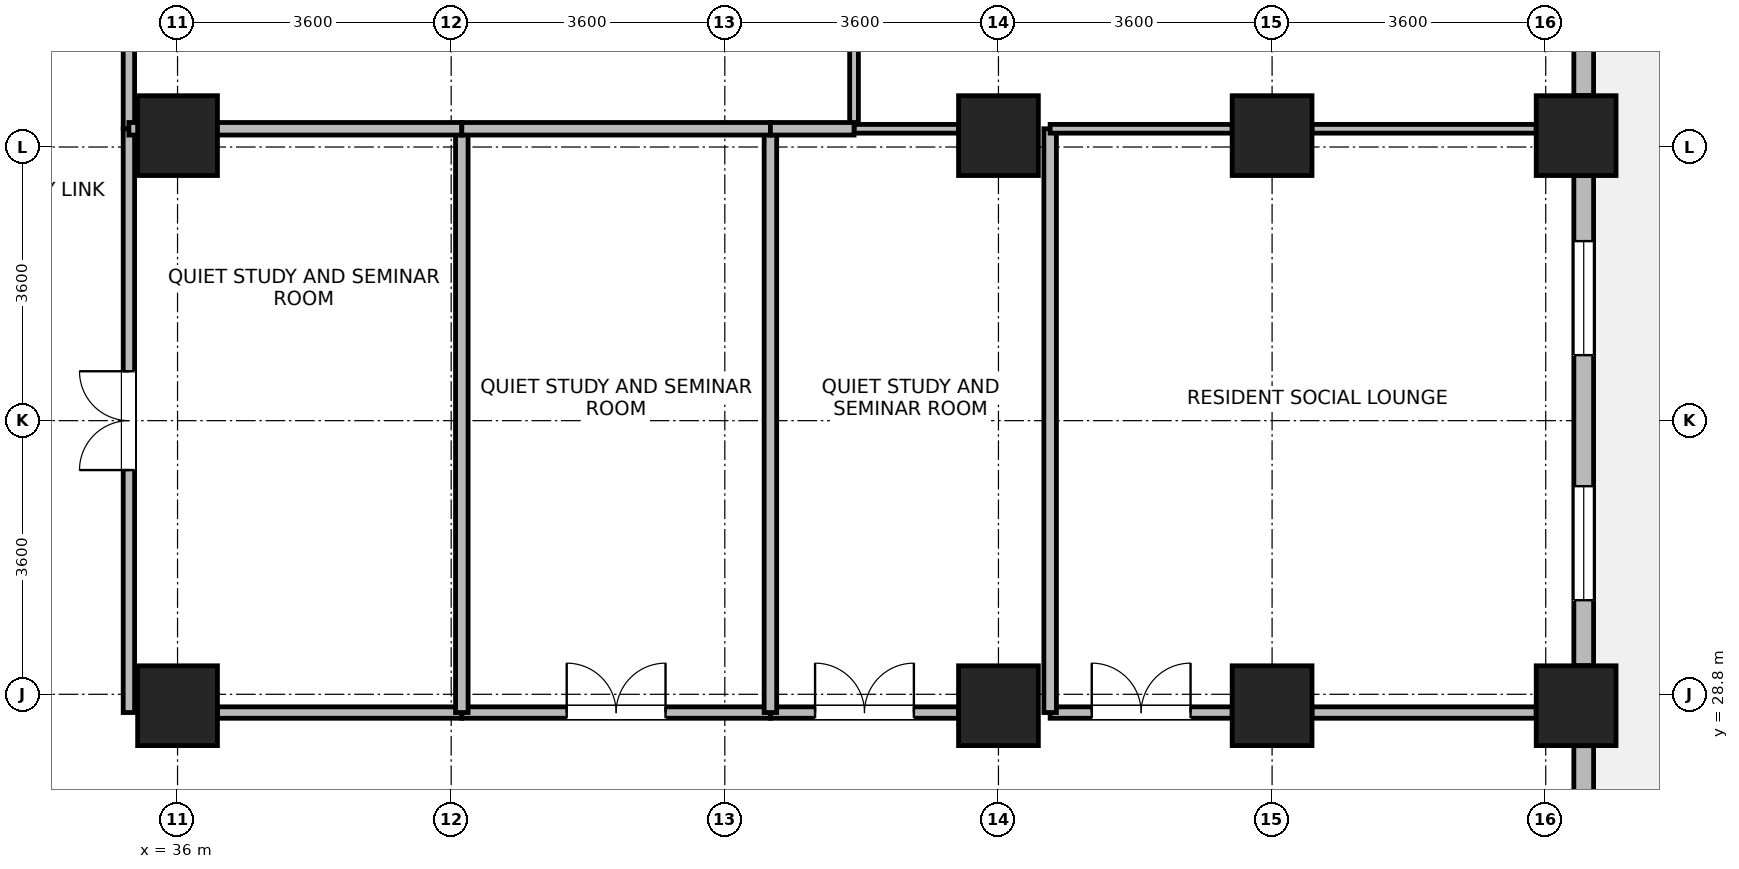
"""IFC4 building model, lengths in metres.
Left out: names, types, materials, properties, quantities, classifications, styles, units other than length and angle.
Written with IfcOpenShell. Run it as: python <this file> out.ifc"""

import sys

from ifc_helpers import new_model, si_unit, direction, frame, frame_2d, origin, origin_2d, place, context, subcontext, project, spatial, rectangle, extrude, source, transform, mapped, element, fill, save


model = new_model("IFC4")
c1 = context("Model", 3, precision=1e-05, world=origin(), true_north=direction((0.0, 1.0)))
c2 = subcontext(c1, "Body", "Model", "MODEL_VIEW")
j1 = project(units=[si_unit("LENGTHUNIT", "METRE"), si_unit("PLANEANGLEUNIT", "RADIAN")], contexts=[c1])
p1 = place(None, origin())
s1 = spatial("IfcSite", under=j1, at=p1, CompositionType="ELEMENT")
p2 = place(p1, origin())
s2 = spatial("IfcBuilding", under=s1, at=p2, CompositionType="ELEMENT")
p3 = place(p2, frame((0.0, 0.0, 173.5)))
s3 = spatial("IfcBuildingStorey", under=s2, at=p3, CompositionType="ELEMENT", Elevation=173.5)
m1 = source(origin(), c2, "Body", "SweptSolid", [
    extrude(rectangle(XDim=1.05, YDim=1.05, at=origin_2d()), origin(), (0.0, 0.0, 1.0), 3.7),
])
for number, where, z_axis, x_axis in (
    (1, (36.0, 28.65, 0.0), (0.0, 0.0, 1.0), (1.0, 0.0, 0.0)),
    (2, (36.0, 36.15, 0.0), (0.0, 0.0, 1.0), (1.0, 0.0, 0.0)),
    (3, (46.8, 28.65, 0.0), (0.0, 0.0, 1.0), (1.0, 0.0, 0.0)),
    (4, (46.8, 36.15, 0.0), (0.0, 0.0, 1.0), (1.0, 0.0, 0.0)),
    (5, (50.4, 28.65, 0.0), (0.0, 0.0, 1.0), (1.0, 0.0, 0.0)),
    (6, (50.4, 36.15, 0.0), (0.0, 0.0, 1.0), (1.0, 0.0, 0.0)),
    (7, (54.4, 28.65, 0.0), (0.0, 0.0, 1.0), (1.0, 0.0, 0.0)),
    (8, (54.4, 36.15, 0.0), (0.0, 0.0, 1.0), (1.0, 0.0, 0.0)),
):
    element("IfcColumn", number, at=place(p3, frame(where, z_axis=z_axis, x_axis=x_axis)), inside=s3, PredefinedType="COLUMN", context=c2, shape_type="MappedRepresentation", body=[
        mapped(m1, transform((0.0, 0.0, 0.0), x_axis=(1.0, 0.0, 0.0), y_axis=(0.0, 1.0, 0.0), z_axis=(0.0, 0.0, 1.0), scale=1.0)),
    ])
p4 = place(p3, frame((54.5, 28.124, 0.0), z_axis=(0.0, 0.0, 1.0), x_axis=(0.0, -1.0, 0.0)))
e9 = element("IfcWall", 9, at=p4, inside=s3, PredefinedType="STANDARD", context=c2, shape_type="SweptSolid", body=[
    extrude(rectangle(XDim=5.998, YDim=0.26, at=frame_2d((2.999, 0.0))), origin(), (0.0, 0.0, 1.0), 2.99),
])
p5 = place(p4, frame((3.749, 0.0, 0.85)))
e10 = element("IfcOpeningElement", 10, at=p5, cuts=e9, PredefinedType="OPENING", context=c2, shape_type="SweptSolid", body=[
    extrude(rectangle(XDim=1.5, YDim=1.85, at=frame_2d((0.75, 0.925))), frame((0.0, 0.14, 0.0), z_axis=(0.0, -1.0, 0.0), x_axis=(1.0, 0.0, 0.0)), (0.0, 0.0, 1.0), 0.28),
])
p6 = place(p4, frame((2.044, 0.0, 0.85)))
e11 = element("IfcOpeningElement", 11, at=p6, cuts=e9, PredefinedType="OPENING", context=c2, shape_type="SweptSolid", body=[
    extrude(rectangle(XDim=0.95, YDim=1.75, at=frame_2d((0.475, 0.875))), frame((0.0, 0.14, 0.0), z_axis=(0.0, -1.0, 0.0), x_axis=(1.0, 0.0, 0.0)), (0.0, 0.0, 1.0), 0.28),
])
p7 = place(p3, frame((54.5, 35.624, 0.0), z_axis=(0.0, 0.0, 1.0), x_axis=(0.0, -1.0, 0.0)))
e12 = element("IfcWall", 12, at=p7, inside=s3, PredefinedType="STANDARD", context=c2, shape_type="SweptSolid", body=[
    extrude(rectangle(XDim=6.448, YDim=0.26, at=frame_2d((3.224, 0.0))), origin(), (0.0, 0.0, 1.0), 2.99),
])
p8 = place(p7, frame((0.862, 0.0, 0.85)))
e13 = element("IfcOpeningElement", 13, at=p8, cuts=e12, PredefinedType="OPENING", context=c2, shape_type="SweptSolid", body=[
    extrude(rectangle(XDim=1.5, YDim=1.85, at=frame_2d((0.75, 0.925))), frame((0.0, 0.14, 0.0), z_axis=(0.0, -1.0, 0.0), x_axis=(1.0, 0.0, 0.0)), (0.0, 0.0, 1.0), 0.28),
])
p9 = place(p7, frame((4.086, 0.0, 0.85)))
e14 = element("IfcOpeningElement", 14, at=p9, cuts=e12, PredefinedType="OPENING", context=c2, shape_type="SweptSolid", body=[
    extrude(rectangle(XDim=1.5, YDim=1.85, at=frame_2d((0.75, 0.925))), frame((0.0, 0.14, 0.0), z_axis=(0.0, -1.0, 0.0), x_axis=(1.0, 0.0, 0.0)), (0.0, 0.0, 1.0), 0.28),
])
p10 = place(p3, frame((54.5, 39.73, 0.0), z_axis=(0.0, 0.0, 1.0), x_axis=(0.0, -1.0, 0.0)))
e15 = element("IfcWall", 15, at=p10, inside=s3, PredefinedType="STANDARD", context=c2, shape_type="SweptSolid", body=[
    extrude(rectangle(XDim=3.054, YDim=0.26, at=frame_2d((1.527, 0.0))), origin(), (0.0, 0.0, 1.0), 3.44),
])
p11 = place(p10, frame((0.777, 0.0, 0.85)))
e16 = element("IfcOpeningElement", 16, at=p11, cuts=e15, PredefinedType="OPENING", context=c2, shape_type="SweptSolid", body=[
    extrude(rectangle(XDim=1.5, YDim=1.85, at=frame_2d((0.75, 0.925))), frame((0.0, 0.14, 0.0), z_axis=(0.0, -1.0, 0.0), x_axis=(1.0, 0.0, 0.0)), (0.0, 0.0, 1.0), 0.28),
])
p12 = place(p3, frame((35.36, 28.56, 0.0), z_axis=(0.0, 0.0, 1.0), x_axis=(0.0, 1.0, 0.0)))
e17 = element("IfcWall", 17, at=p12, inside=s3, PredefinedType="PARTITIONING", context=c2, shape_type="SweptSolid", body=[
    extrude(rectangle(XDim=7.68, YDim=0.15, at=frame_2d((3.84, 0.0))), origin(), (0.0, 0.0, 1.0), 3.44),
])
p13 = place(p12, frame((3.19, 0.0, 0.0)))
e18 = element("IfcOpeningElement", 18, at=p13, cuts=e17, PredefinedType="OPENING", context=c2, shape_type="SweptSolid", body=[
    extrude(rectangle(XDim=1.3, YDim=2.12, at=frame_2d((0.65, 1.06))), frame((0.0, 0.085, 0.0), z_axis=(0.0, -1.0, 0.0), x_axis=(1.0, 0.0, 0.0)), (0.0, 0.0, 1.0), 0.17),
])
p14 = place(p3, frame((47.48, 28.56, 0.0), z_axis=(0.0, 0.0, 1.0), x_axis=(1.0, 0.0, 0.0)))
e19 = element("IfcWall", 19, at=p14, inside=s3, PredefinedType="PARTITIONING", context=c2, shape_type="SweptSolid", body=[
    extrude(rectangle(XDim=2.395, YDim=0.15, at=frame_2d((1.198, 0.0))), origin(), (0.0, 0.0, 1.0), 2.84),
])
p15 = place(p14, frame((0.548, 0.0, 0.0)))
e20 = element("IfcOpeningElement", 20, at=p15, cuts=e19, PredefinedType="OPENING", context=c2, shape_type="SweptSolid", body=[
    extrude(rectangle(XDim=1.3, YDim=2.12, at=frame_2d((0.65, 1.06))), frame((0.0, 0.085, 0.0), z_axis=(0.0, -1.0, 0.0), x_axis=(1.0, 0.0, 0.0)), (0.0, 0.0, 1.0), 0.17),
])
p16 = place(p3, frame((50.925, 28.56, 0.0), z_axis=(0.0, 0.0, 1.0), x_axis=(1.0, 0.0, 0.0)))
e21 = element("IfcWall", 21, at=p16, inside=s3, PredefinedType="PARTITIONING", context=c2, shape_type="SweptSolid", body=[
    extrude(rectangle(XDim=2.95, YDim=0.15, at=frame_2d((1.475, 0.0))), origin(), (0.0, 0.0, 1.0), 2.84),
])
p17 = place(p3, frame((36.525, 28.56, 0.0), z_axis=(0.0, 0.0, 1.0), x_axis=(1.0, 0.0, 0.0)))
e22 = element("IfcWall", 22, at=p17, inside=s3, PredefinedType="PARTITIONING", context=c2, shape_type="SweptSolid", body=[
    extrude(rectangle(XDim=3.215, YDim=0.15, at=frame_2d((1.607, 0.0))), origin(), (0.0, 0.0, 1.0), 2.84),
])
p18 = place(p3, frame((39.74, 28.56, 0.0), z_axis=(0.0, 0.0, 1.0), x_axis=(1.0, 0.0, 0.0)))
e23 = element("IfcWall", 23, at=p18, inside=s3, PredefinedType="PARTITIONING", context=c2, shape_type="SweptSolid", body=[
    extrude(rectangle(XDim=4.06, YDim=0.15, at=frame_2d((2.03, 0.0))), origin(), (0.0, 0.0, 1.0), 2.84),
])
p19 = place(p18, frame((1.38, 0.0, 0.0)))
e24 = element("IfcOpeningElement", 24, at=p19, cuts=e23, PredefinedType="OPENING", context=c2, shape_type="SweptSolid", body=[
    extrude(rectangle(XDim=1.3, YDim=2.12, at=frame_2d((0.65, 1.06))), frame((0.0, 0.085, 0.0), z_axis=(0.0, -1.0, 0.0), x_axis=(1.0, 0.0, 0.0)), (0.0, 0.0, 1.0), 0.17),
])
p20 = place(p3, frame((43.8, 28.56, 0.0), z_axis=(0.0, 0.0, 1.0), x_axis=(1.0, 0.0, 0.0)))
e25 = element("IfcWall", 25, at=p20, inside=s3, PredefinedType="PARTITIONING", context=c2, shape_type="SweptSolid", body=[
    extrude(rectangle(XDim=2.475, YDim=0.15, at=frame_2d((1.237, 0.0))), origin(), (0.0, 0.0, 1.0), 2.84),
])
p21 = place(p20, frame((0.587, 0.0, 0.0)))
e26 = element("IfcOpeningElement", 26, at=p21, cuts=e25, PredefinedType="OPENING", context=c2, shape_type="SweptSolid", body=[
    extrude(rectangle(XDim=1.3, YDim=2.12, at=frame_2d((0.65, 1.06))), frame((0.0, 0.085, 0.0), z_axis=(0.0, -1.0, 0.0), x_axis=(1.0, 0.0, 0.0)), (0.0, 0.0, 1.0), 0.17),
])
p22 = place(p3, frame((35.36, 36.24, 0.0), z_axis=(0.0, 0.0, 1.0), x_axis=(0.0, 1.0, 0.0)))
e27 = element("IfcWall", 27, at=p22, inside=s3, PredefinedType="PARTITIONING", context=c2, shape_type="SweptSolid", body=[
    extrude(rectangle(XDim=1.96, YDim=0.15, at=frame_2d((0.98, 0.0))), origin(), (0.0, 0.0, 1.0), 3.44),
])
for number, where, z_axis, x_axis in (
    (28, (39.74, 28.56, 0.0), (0.0, 0.0, 1.0), (0.0, 1.0, 0.0)),
    (29, (43.8, 28.56, 0.0), (0.0, 0.0, 1.0), (0.0, 1.0, 0.0)),
    (30, (47.48, 28.56, 0.0), (0.0, 0.0, 1.0), (0.0, 1.0, 0.0)),
):
    element("IfcWall", number, at=place(p3, frame(where, z_axis=z_axis, x_axis=x_axis)), inside=s3, PredefinedType="PARTITIONING", context=c2, shape_type="SweptSolid", body=[
        extrude(rectangle(XDim=7.68, YDim=0.165, at=frame_2d((3.84, 0.0))), origin(), (0.0, 0.0, 1.0), 3.44),
    ])
p23 = place(p3, frame((47.48, 36.24, 0.0), z_axis=(0.0, 0.0, 1.0), x_axis=(1.0, 0.0, 0.0)))
e31 = element("IfcWall", 31, at=p23, inside=s3, PredefinedType="PARTITIONING", context=c2, shape_type="SweptSolid", body=[
    extrude(rectangle(XDim=2.395, YDim=0.115, at=frame_2d((1.198, 0.0))), origin(), (0.0, 0.0, 1.0), 2.84),
])
p24 = place(p3, frame((50.925, 36.24, 0.0), z_axis=(0.0, 0.0, 1.0), x_axis=(1.0, 0.0, 0.0)))
e32 = element("IfcWall", 32, at=p24, inside=s3, PredefinedType="PARTITIONING", context=c2, shape_type="SweptSolid", body=[
    extrude(rectangle(XDim=2.95, YDim=0.115, at=frame_2d((1.475, 0.0))), origin(), (0.0, 0.0, 1.0), 2.84),
])
p25 = place(p3, frame((44.9, 36.24, 0.0), z_axis=(0.0, 0.0, 1.0), x_axis=(0.0, 1.0, 0.0)))
e33 = element("IfcWall", 33, at=p25, inside=s3, PredefinedType="PARTITIONING", context=c2, shape_type="SweptSolid", body=[
    extrude(rectangle(XDim=3.228, YDim=0.115, at=frame_2d((1.614, 0.0))), origin(), (0.0, 0.0, 1.0), 3.44),
])
p26 = place(p3, frame((35.36, 36.24, 0.0), z_axis=(0.0, 0.0, 1.0), x_axis=(1.0, 0.0, 0.0)))
e34 = element("IfcWall", 34, at=p26, inside=s3, PredefinedType="PARTITIONING", context=c2, shape_type="SweptSolid", body=[
    extrude(rectangle(XDim=4.38, YDim=0.165, at=frame_2d((2.19, 0.0))), origin(), (0.0, 0.0, 1.0), 2.84),
])
p27 = place(p3, frame((39.74, 36.24, 0.0), z_axis=(0.0, 0.0, 1.0), x_axis=(1.0, 0.0, 0.0)))
e35 = element("IfcWall", 35, at=p27, inside=s3, PredefinedType="PARTITIONING", context=c2, shape_type="SweptSolid", body=[
    extrude(rectangle(XDim=4.06, YDim=0.165, at=frame_2d((2.03, 0.0))), origin(), (0.0, 0.0, 1.0), 2.84),
])
p28 = place(p3, frame((44.9, 36.24, 0.0), z_axis=(0.0, 0.0, 1.0), x_axis=(1.0, 0.0, 0.0)))
e36 = element("IfcWall", 36, at=p28, inside=s3, PredefinedType="PARTITIONING", context=c2, shape_type="SweptSolid", body=[
    extrude(rectangle(XDim=1.375, YDim=0.115, at=frame_2d((0.688, 0.0))), origin(), (0.0, 0.0, 1.0), 2.84),
])
p29 = place(p3, frame((43.8, 36.24, 0.0), z_axis=(0.0, 0.0, 1.0), x_axis=(1.0, 0.0, 0.0)))
e37 = element("IfcWall", 37, at=p29, inside=s3, PredefinedType="PARTITIONING", context=c2, shape_type="SweptSolid", body=[
    extrude(rectangle(XDim=1.1, YDim=0.165, at=frame_2d((0.55, 0.0))), origin(), (0.0, 0.0, 1.0), 2.84),
])
p30 = place(p8, origin())
e38 = element("IfcWindow", 38, at=p30, inside=s3, PartitioningType="SINGLE_PANEL", PredefinedType="WINDOW", context=c2, shape_type="SweptSolid", body=[
    extrude(rectangle(XDim=1.5, YDim=1.85, at=frame_2d((0.75, 0.925))), frame((0.0, 0.03, 0.0), z_axis=(0.0, -1.0, 0.0), x_axis=(1.0, 0.0, 0.0)), (0.0, 0.0, 1.0), 0.06),
])
fill(e13, e38)
p31 = place(p9, origin())
e39 = element("IfcWindow", 39, at=p31, inside=s3, PartitioningType="SINGLE_PANEL", PredefinedType="WINDOW", context=c2, shape_type="SweptSolid", body=[
    extrude(rectangle(XDim=1.5, YDim=1.85, at=frame_2d((0.75, 0.925))), frame((0.0, 0.03, 0.0), z_axis=(0.0, -1.0, 0.0), x_axis=(1.0, 0.0, 0.0)), (0.0, 0.0, 1.0), 0.06),
])
fill(e14, e39)
p32 = place(p13, origin())
e40 = element("IfcDoor", 40, at=p32, inside=s3, OperationType="DOUBLE_DOOR_SINGLE_SWING", PredefinedType="DOOR", context=c2, shape_type="SweptSolid", body=[
    extrude(rectangle(XDim=1.3, YDim=2.12, at=frame_2d((0.65, 1.06))), frame((0.0, 0.025, 0.0), z_axis=(0.0, -1.0, 0.0), x_axis=(1.0, 0.0, 0.0)), (0.0, 0.0, 1.0), 0.05),
])
fill(e18, e40)
p33 = place(p15, origin())
e41 = element("IfcDoor", 41, at=p33, inside=s3, OperationType="DOUBLE_DOOR_SINGLE_SWING", PredefinedType="DOOR", context=c2, shape_type="SweptSolid", body=[
    extrude(rectangle(XDim=1.3, YDim=2.12, at=frame_2d((0.65, 1.06))), frame((0.0, 0.025, 0.0), z_axis=(0.0, -1.0, 0.0), x_axis=(1.0, 0.0, 0.0)), (0.0, 0.0, 1.0), 0.05),
])
fill(e20, e41)
p34 = place(p19, origin())
e42 = element("IfcDoor", 42, at=p34, inside=s3, OperationType="DOUBLE_DOOR_SINGLE_SWING", PredefinedType="DOOR", context=c2, shape_type="SweptSolid", body=[
    extrude(rectangle(XDim=1.3, YDim=2.12, at=frame_2d((0.65, 1.06))), frame((0.0, 0.025, 0.0), z_axis=(0.0, -1.0, 0.0), x_axis=(1.0, 0.0, 0.0)), (0.0, 0.0, 1.0), 0.05),
])
fill(e24, e42)
p35 = place(p21, origin())
e43 = element("IfcDoor", 43, at=p35, inside=s3, OperationType="DOUBLE_DOOR_SINGLE_SWING", PredefinedType="DOOR", context=c2, shape_type="SweptSolid", body=[
    extrude(rectangle(XDim=1.3, YDim=2.12, at=frame_2d((0.65, 1.06))), frame((0.0, 0.025, 0.0), z_axis=(0.0, -1.0, 0.0), x_axis=(1.0, 0.0, 0.0)), (0.0, 0.0, 1.0), 0.05),
])
fill(e26, e43)
save(model, sys.argv[1])
